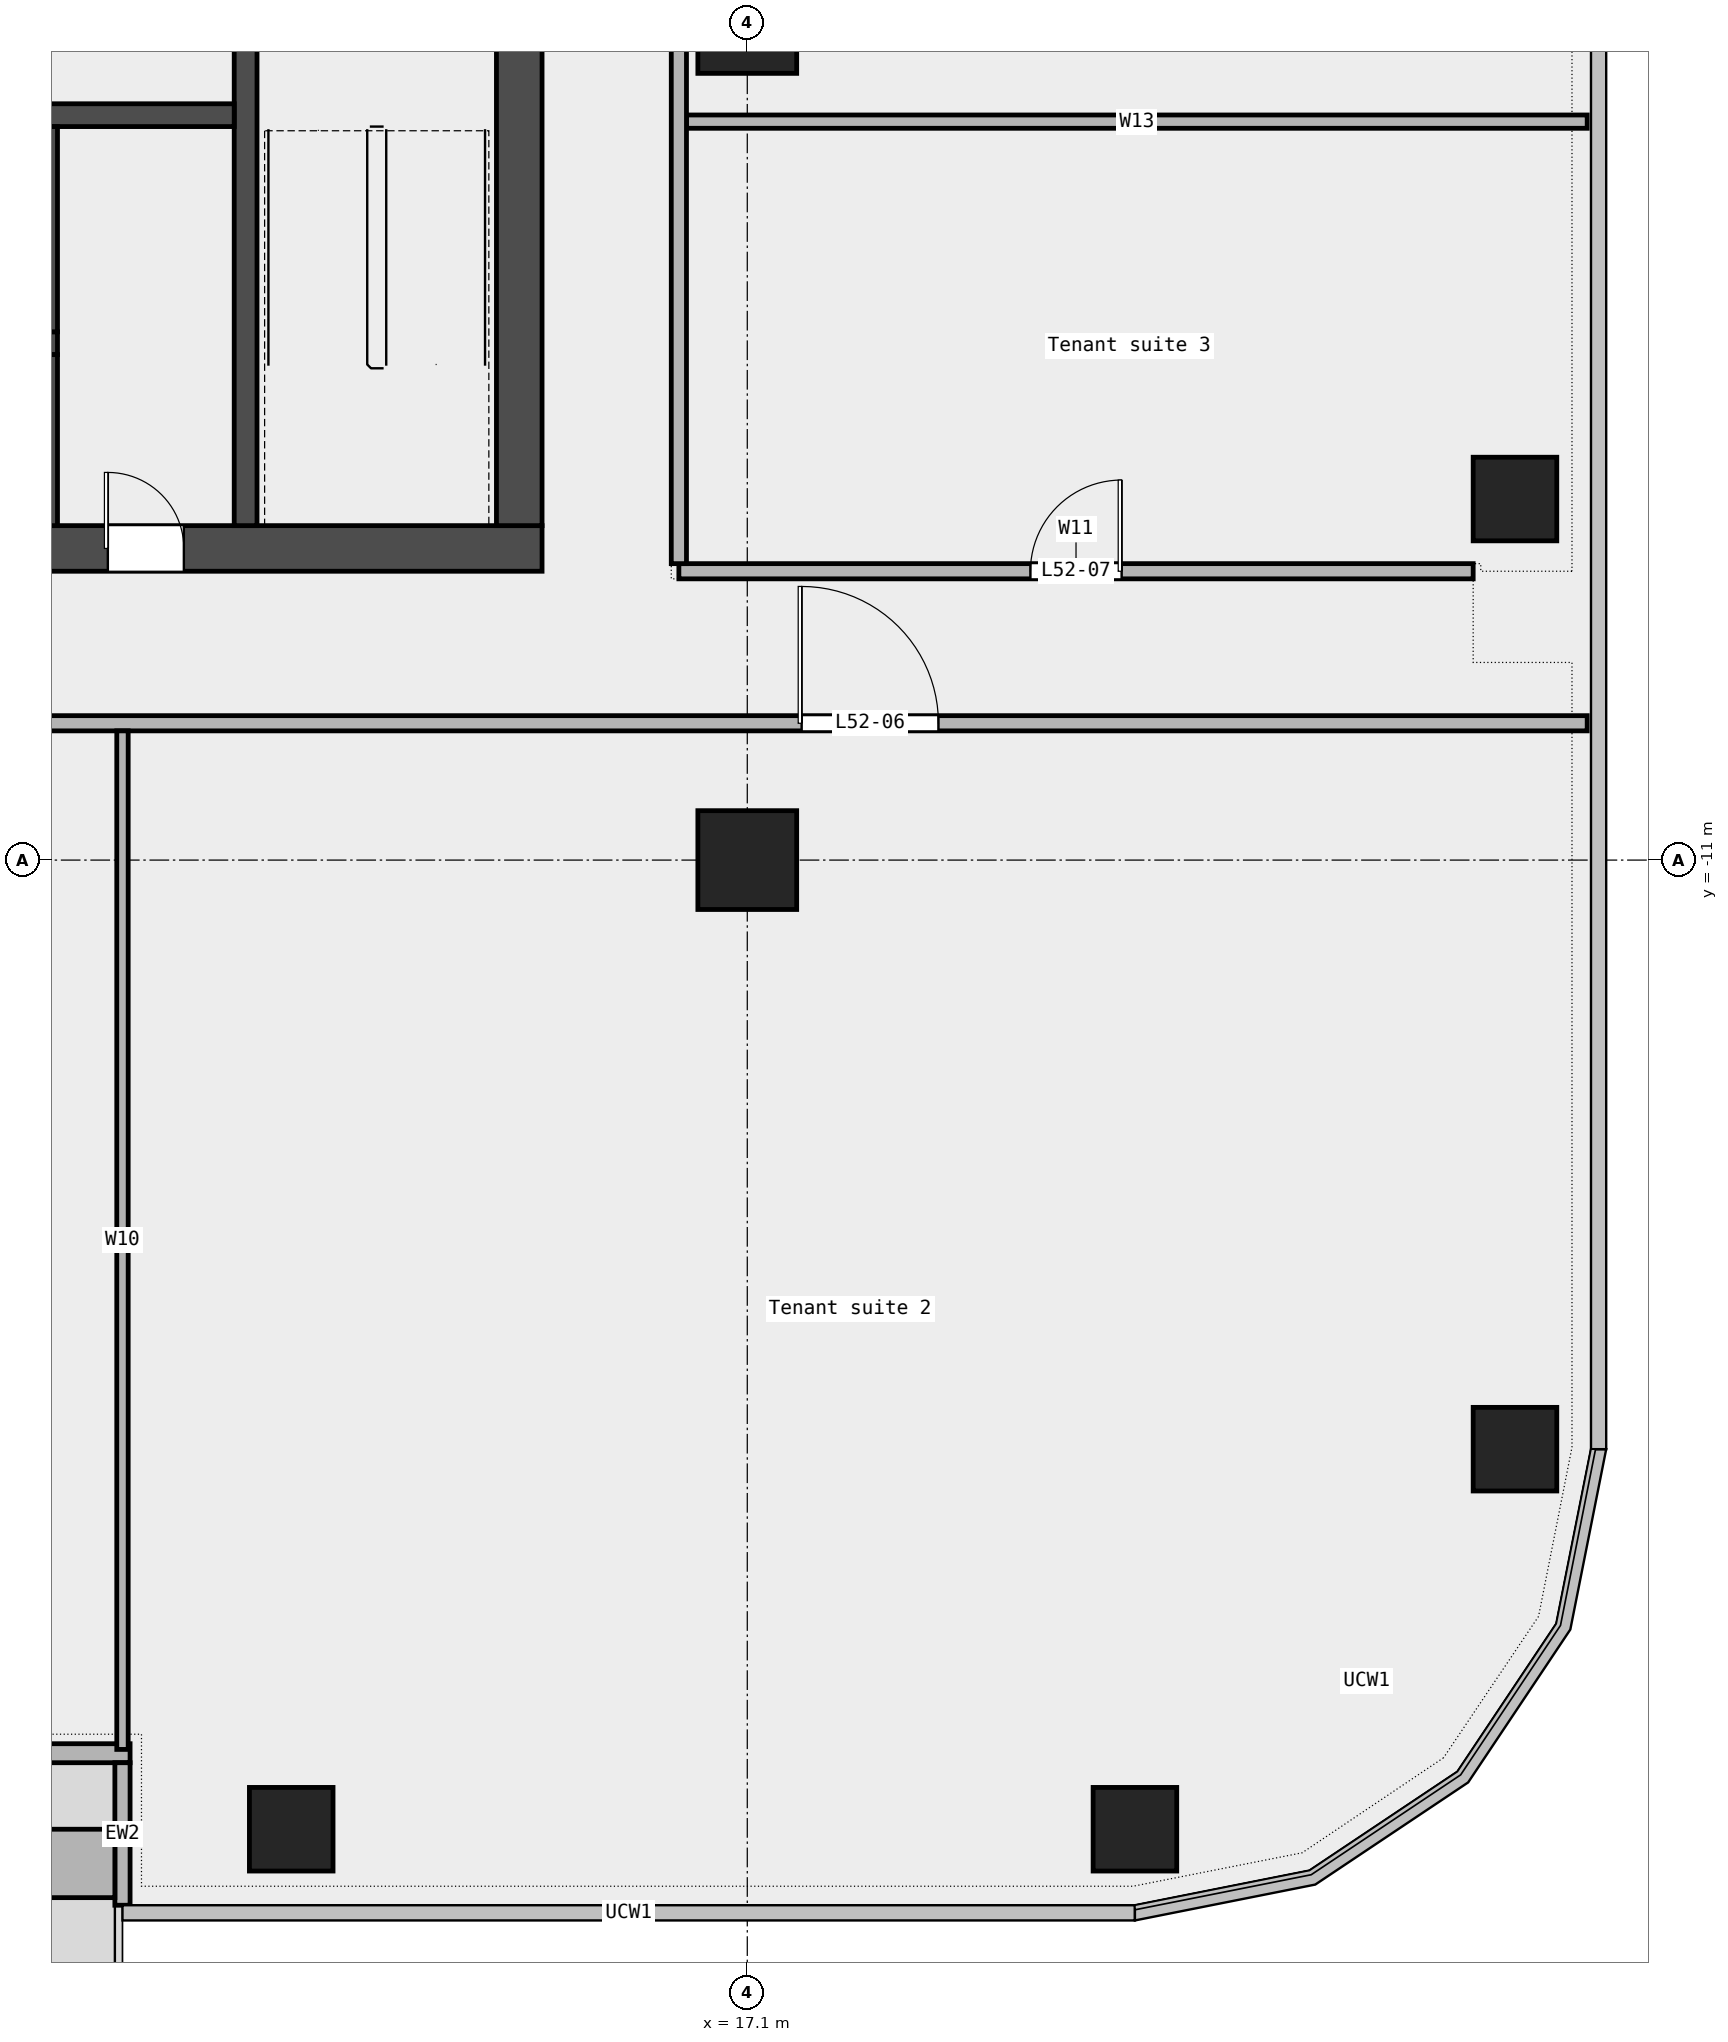
"""IFC4 building model, lengths in metres.
Left out: names, types, materials, properties, quantities, classifications, styles, units other than length and angle.
Written with IfcOpenShell. Run it as: python <this file> out.ifc"""

import sys

from ifc_helpers import new_model, si_unit, direction, frame, frame_2d, origin, origin_2d, place, context, subcontext, project, spatial, rectangle, extrude, element, fill, save


model = new_model("IFC4")
c1 = context("Model", 3, precision=1e-05, world=origin(), true_north=direction((0.0, 1.0)))
c2 = subcontext(c1, "Body", "Model", "MODEL_VIEW")
j1 = project(units=[si_unit("LENGTHUNIT", "METRE"), si_unit("PLANEANGLEUNIT", "RADIAN")], contexts=[c1])
p1 = place(None, origin())
s1 = spatial("IfcSite", under=j1, at=p1, CompositionType="ELEMENT")
p2 = place(p1, origin())
s2 = spatial("IfcBuilding", under=s1, at=p2, CompositionType="ELEMENT")
p3 = place(p2, frame((0.0, 0.0, 243.0)))
s3 = spatial("IfcBuildingStorey", under=s2, at=p3, CompositionType="ELEMENT", Elevation=243.0)
for number, where, z_axis, x_axis in (
    (1, (11.1, -23.75, 0.0), (0.0, 0.0, 1.0), (1.0, 0.0, 0.0)),
    (2, (22.2, -23.75, 0.0), (0.0, 0.0, 1.0), (1.0, 0.0, 0.0)),
    (3, (27.2, -18.75, 0.0), (0.0, 0.0, 1.0), (1.0, 0.0, 0.0)),
    (4, (27.2, -6.25, 0.0), (0.0, 0.0, 1.0), (1.0, 0.0, 0.0)),
):
    element("IfcColumn", number, at=place(p3, frame(where, z_axis=z_axis, x_axis=x_axis)), inside=s3, PredefinedType="COLUMN", context=c2, shape_type="SweptSolid", body=[
        extrude(rectangle(XDim=1.1, YDim=1.1, at=origin_2d()), origin(), (0.0, 0.0, 1.0), 3.6),
    ])
for number, where, z_axis, x_axis in (
    (5, (17.1, -11.0, 0.0), (0.0, 0.0, 1.0), (1.0, 0.0, 0.0)),
    (6, (17.1, 0.0, 0.0), (0.0, 0.0, 1.0), (1.0, 0.0, 0.0)),
):
    element("IfcColumn", number, at=place(p3, frame(where, z_axis=z_axis, x_axis=x_axis)), inside=s3, PredefinedType="COLUMN", context=c2, shape_type="SweptSolid", body=[
        extrude(rectangle(XDim=1.3, YDim=1.3, at=origin_2d()), origin(), (0.0, 0.0, 1.0), 3.6),
    ])
p4 = place(p3, frame((-4.54, -22.75, 0.0), z_axis=(0.0, 0.0, 1.0), x_axis=(1.0, 0.0, 0.0)))
e7 = element("IfcWall", 7, at=p4, inside=s3, PredefinedType="STANDARD", context=c2, shape_type="SweptSolid", body=[
    extrude(rectangle(XDim=13.52, YDim=0.25, at=frame_2d((6.76, 0.0))), origin(), (0.0, 0.0, 1.0), 3.6),
])
p5 = place(p4, frame((1.5, 0.0, 0.45)))
e8 = element("IfcOpeningElement", 8, at=p5, cuts=e7, PredefinedType="OPENING", context=c2, shape_type="SweptSolid", body=[
    extrude(rectangle(XDim=1.5, YDim=2.4, at=frame_2d((0.75, 1.2))), frame((0.0, 0.137, 0.0), z_axis=(0.0, -1.0, 0.0), x_axis=(1.0, 0.0, 0.0)), (0.0, 0.0, 1.0), 0.274),
])
p6 = place(p4, frame((5.75, 0.0, 0.0)))
e9 = element("IfcOpeningElement", 9, at=p6, cuts=e7, PredefinedType="OPENING", context=c2, shape_type="SweptSolid", body=[
    extrude(rectangle(XDim=1.8, YDim=2.4, at=frame_2d((0.9, 1.2))), frame((0.0, 0.137, 0.0), z_axis=(0.0, -1.0, 0.0), x_axis=(1.0, 0.0, 0.0)), (0.0, 0.0, 1.0), 0.274),
])
p7 = place(p4, frame((10.5, 0.0, 0.45)))
e10 = element("IfcOpeningElement", 10, at=p7, cuts=e7, PredefinedType="OPENING", context=c2, shape_type="SweptSolid", body=[
    extrude(rectangle(XDim=1.5, YDim=2.4, at=frame_2d((0.75, 1.2))), frame((0.0, 0.137, 0.0), z_axis=(0.0, -1.0, 0.0), x_axis=(1.0, 0.0, 0.0)), (0.0, 0.0, 1.0), 0.274),
])
p8 = place(p3, frame((8.88, -24.75, 0.0), z_axis=(0.0, 0.0, 1.0), x_axis=(0.0, 1.0, 0.0)))
e11 = element("IfcWall", 11, at=p8, inside=s3, PredefinedType="STANDARD", context=c2, shape_type="SweptSolid", body=[
    extrude(rectangle(XDim=1.875, YDim=0.2, at=frame_2d((0.938, 0.0))), origin(), (0.0, 0.0, 1.0), 3.6),
])
p9 = place(p3, frame((5.18, -24.2, 0.0), z_axis=(0.0, 0.0, 1.0), x_axis=(1.0, 0.0, 0.0)))
e12 = element("IfcWall", 12, at=p9, inside=s3, PredefinedType="STANDARD", context=c2, shape_type="SweptSolid", body=[
    extrude(rectangle(XDim=3.6, YDim=0.9, at=frame_2d((1.8, 0.0))), origin(), (0.0, 0.0, 1.0), 0.7),
])
p10 = place(p3, frame((-28.15, -9.2, 0.0), z_axis=(0.0, 0.0, 1.0), x_axis=(1.0, 0.0, 0.0)))
e13 = element("IfcWall", 13, at=p10, inside=s3, PredefinedType="PARTITIONING", context=c2, shape_type="SweptSolid", body=[
    extrude(rectangle(XDim=56.3, YDim=0.2, at=frame_2d((28.15, 0.0))), origin(), (0.0, 0.0, 1.0), 3.6),
])
p11 = place(p10, frame((29.47, 0.0, 0.0)))
e14 = element("IfcOpeningElement", 14, at=p11, cuts=e13, PredefinedType="OPENING", context=c2, shape_type="SweptSolid", body=[
    extrude(rectangle(XDim=1.8, YDim=2.1, at=frame_2d((0.9, 1.05))), frame((0.0, 0.112, 0.0), z_axis=(0.0, -1.0, 0.0), x_axis=(1.0, 0.0, 0.0)), (0.0, 0.0, 1.0), 0.224),
])
p12 = place(p10, frame((45.965, 0.0, 0.0)))
e15 = element("IfcOpeningElement", 15, at=p12, cuts=e13, PredefinedType="OPENING", context=c2, shape_type="SweptSolid", body=[
    extrude(rectangle(XDim=1.8, YDim=2.1, at=frame_2d((0.9, 1.05))), frame((0.0, 0.112, 0.0), z_axis=(0.0, -1.0, 0.0), x_axis=(1.0, 0.0, 0.0)), (0.0, 0.0, 1.0), 0.224),
])
p13 = place(p10, frame((11.955, 0.0, 0.0)))
e16 = element("IfcOpeningElement", 16, at=p13, cuts=e13, PredefinedType="OPENING", context=c2, shape_type="SweptSolid", body=[
    extrude(rectangle(XDim=1.8, YDim=2.1, at=frame_2d((0.9, 1.05))), frame((0.0, 0.112, 0.0), z_axis=(0.0, -1.0, 0.0), x_axis=(1.0, 0.0, 0.0)), (0.0, 0.0, 1.0), 0.224),
])
p14 = place(p3, frame((16.2, -7.2, 0.0), z_axis=(0.0, 0.0, 1.0), x_axis=(1.0, 0.0, 0.0)))
e17 = element("IfcWall", 17, at=p14, inside=s3, PredefinedType="PARTITIONING", context=c2, shape_type="SweptSolid", body=[
    extrude(rectangle(XDim=10.45, YDim=0.2, at=frame_2d((5.225, 0.0))), origin(), (0.0, 0.0, 1.0), 3.6),
])
p15 = place(p14, frame((4.625, 0.0, 0.0)))
e18 = element("IfcOpeningElement", 18, at=p15, cuts=e17, PredefinedType="OPENING", context=c2, shape_type="SweptSolid", body=[
    extrude(rectangle(XDim=1.2, YDim=2.1, at=frame_2d((0.6, 1.05))), frame((0.0, 0.112, 0.0), z_axis=(0.0, -1.0, 0.0), x_axis=(1.0, 0.0, 0.0)), (0.0, 0.0, 1.0), 0.224),
])
p16 = place(p3, frame((16.3, -1.285, 0.0), z_axis=(0.0, 0.0, 1.0), x_axis=(1.0, 0.0, 0.0)))
e19 = element("IfcWall", 19, at=p16, inside=s3, PredefinedType="PARTITIONING", context=c2, shape_type="SweptSolid", body=[
    extrude(rectangle(XDim=11.85, YDim=0.175, at=frame_2d((5.925, 0.0))), origin(), (0.0, 0.0, 1.0), 3.6),
])
p17 = place(p3, frame((8.88, -22.7, 0.0), z_axis=(0.0, 0.0, 1.0), x_axis=(0.0, 1.0, 0.0)))
e20 = element("IfcWall", 20, at=p17, inside=s3, PredefinedType="PARTITIONING", context=c2, shape_type="SweptSolid", body=[
    extrude(rectangle(XDim=13.4, YDim=0.15, at=frame_2d((6.7, 0.0))), origin(), (0.0, 0.0, 1.0), 3.6),
])
p18 = place(p3, frame((16.2, -7.1, 0.0), z_axis=(0.0, 0.0, 1.0), x_axis=(0.0, 1.0, 0.0)))
e21 = element("IfcWall", 21, at=p18, inside=s3, PredefinedType="PARTITIONING", context=c2, shape_type="SweptSolid", body=[
    extrude(rectangle(XDim=20.5, YDim=0.2, at=frame_2d((10.25, 0.0))), origin(), (0.0, 0.0, 1.0), 3.6),
])
p19 = place(p18, frame((12.258, 0.0, 0.0)))
e22 = element("IfcOpeningElement", 22, at=p19, cuts=e21, PredefinedType="OPENING", context=c2, shape_type="SweptSolid", body=[
    extrude(rectangle(XDim=1.8, YDim=2.1, at=frame_2d((0.9, 1.05))), frame((0.0, 0.112, 0.0), z_axis=(0.0, -1.0, 0.0), x_axis=(1.0, 0.0, 0.0)), (0.0, 0.0, 1.0), 0.224),
])
p20 = place(p3, frame((-14.4, -6.9, 0.0), z_axis=(0.0, 0.0, 1.0), x_axis=(1.0, 0.0, 0.0)))
e23 = element("IfcWall", 23, at=p20, inside=s3, PredefinedType="SHEAR", context=c2, shape_type="SweptSolid", body=[
    extrude(rectangle(XDim=28.8, YDim=0.6, at=frame_2d((14.4, 0.0))), origin(), (0.0, 0.0, 1.0), 3.7),
])
p21 = place(p20, frame((4.337, 0.0, 0.0)))
e24 = element("IfcOpeningElement", 24, at=p21, cuts=e23, PredefinedType="OPENING", context=c2, shape_type="SweptSolid", body=[
    extrude(rectangle(XDim=1.0, YDim=2.1, at=frame_2d((0.5, 1.05))), frame((0.0, 0.312, 0.0), z_axis=(0.0, -1.0, 0.0), x_axis=(1.0, 0.0, 0.0)), (0.0, 0.0, 1.0), 0.624),
])
p22 = place(p20, frame((8.55, 0.0, 0.0)))
e25 = element("IfcOpeningElement", 25, at=p22, cuts=e23, PredefinedType="OPENING", context=c2, shape_type="SweptSolid", body=[
    extrude(rectangle(XDim=1.2, YDim=2.1, at=frame_2d((0.6, 1.05))), frame((0.0, 0.312, 0.0), z_axis=(0.0, -1.0, 0.0), x_axis=(1.0, 0.0, 0.0)), (0.0, 0.0, 1.0), 0.624),
])
p23 = place(p20, frame((12.962, 0.0, 0.0)))
e26 = element("IfcOpeningElement", 26, at=p23, cuts=e23, PredefinedType="OPENING", context=c2, shape_type="SweptSolid", body=[
    extrude(rectangle(XDim=1.0, YDim=2.1, at=frame_2d((0.5, 1.05))), frame((0.0, 0.312, 0.0), z_axis=(0.0, -1.0, 0.0), x_axis=(1.0, 0.0, 0.0)), (0.0, 0.0, 1.0), 0.624),
])
p24 = place(p20, frame((15.212, 0.0, 0.0)))
e27 = element("IfcOpeningElement", 27, at=p24, cuts=e23, PredefinedType="OPENING", context=c2, shape_type="SweptSolid", body=[
    extrude(rectangle(XDim=1.0, YDim=2.1, at=frame_2d((0.5, 1.05))), frame((0.0, 0.312, 0.0), z_axis=(0.0, -1.0, 0.0), x_axis=(1.0, 0.0, 0.0)), (0.0, 0.0, 1.0), 0.624),
])
p25 = place(p20, frame((18.75, 0.0, 0.0)))
e28 = element("IfcOpeningElement", 28, at=p25, cuts=e23, PredefinedType="OPENING", context=c2, shape_type="SweptSolid", body=[
    extrude(rectangle(XDim=1.8, YDim=2.1, at=frame_2d((0.9, 1.05))), frame((0.0, 0.312, 0.0), z_axis=(0.0, -1.0, 0.0), x_axis=(1.0, 0.0, 0.0)), (0.0, 0.0, 1.0), 0.624),
])
p26 = place(p20, frame((23.087, 0.0, 0.0)))
e29 = element("IfcOpeningElement", 29, at=p26, cuts=e23, PredefinedType="OPENING", context=c2, shape_type="SweptSolid", body=[
    extrude(rectangle(XDim=1.0, YDim=2.1, at=frame_2d((0.5, 1.05))), frame((0.0, 0.312, 0.0), z_axis=(0.0, -1.0, 0.0), x_axis=(1.0, 0.0, 0.0)), (0.0, 0.0, 1.0), 0.624),
])
p27 = place(p3, frame((14.1, -6.6, 0.0), z_axis=(0.0, 0.0, 1.0), x_axis=(0.0, 1.0, 0.0)))
e30 = element("IfcWall", 30, at=p27, inside=s3, PredefinedType="SHEAR", context=c2, shape_type="SweptSolid", body=[
    extrude(rectangle(XDim=19.5, YDim=0.6, at=frame_2d((9.75, 0.0))), origin(), (0.0, 0.0, 1.0), 3.7),
])
p28 = place(p27, frame((9.3, 0.0, 0.0)))
e31 = element("IfcOpeningElement", 31, at=p28, cuts=e30, PredefinedType="OPENING", context=c2, shape_type="SweptSolid", body=[
    extrude(rectangle(XDim=1.8, YDim=2.1, at=frame_2d((0.9, 1.05))), frame((0.0, 0.312, 0.0), z_axis=(0.0, -1.0, 0.0), x_axis=(1.0, 0.0, 0.0)), (0.0, 0.0, 1.0), 0.624),
])
p29 = place(p3, frame((10.5, -6.6, 0.0), z_axis=(0.0, 0.0, 1.0), x_axis=(0.0, 1.0, 0.0)))
e32 = element("IfcWall", 32, at=p29, inside=s3, PredefinedType="SHEAR", context=c2, shape_type="SweptSolid", body=[
    extrude(rectangle(XDim=8.55, YDim=0.3, at=frame_2d((4.275, 0.0))), origin(), (0.0, 0.0, 1.0), 3.7),
])
p30 = place(p3, frame((-10.35, -1.2, 0.0), z_axis=(0.0, 0.0, 1.0), x_axis=(1.0, 0.0, 0.0)))
e33 = element("IfcWall", 33, at=p30, inside=s3, PredefinedType="SOLIDWALL", context=c2, shape_type="SweptSolid", body=[
    extrude(rectangle(XDim=20.7, YDim=0.3, at=frame_2d((10.35, 0.0))), origin(), (0.0, 0.0, 1.0), 3.7),
])
p31 = place(p3, frame((2.475, -4.2, 0.0), z_axis=(0.0, 0.0, 1.0), x_axis=(1.0, 0.0, 0.0)))
e34 = element("IfcWall", 34, at=p31, inside=s3, PredefinedType="SOLIDWALL", context=c2, shape_type="SweptSolid", body=[
    extrude(rectangle(XDim=5.55, YDim=0.3, at=frame_2d((2.775, 0.0))), origin(), (0.0, 0.0, 1.0), 3.7),
])
p32 = place(p31, frame((0.762, 0.0, 0.0)))
e35 = element("IfcOpeningElement", 35, at=p32, cuts=e34, PredefinedType="OPENING", context=c2, shape_type="SweptSolid", body=[
    extrude(rectangle(XDim=1.4, YDim=2.1, at=frame_2d((0.7, 1.05))), frame((0.0, 0.162, 0.0), z_axis=(0.0, -1.0, 0.0), x_axis=(1.0, 0.0, 0.0)), (0.0, 0.0, 1.0), 0.324),
])
p33 = place(p31, frame((3.387, 0.0, 0.0)))
e36 = element("IfcOpeningElement", 36, at=p33, cuts=e34, PredefinedType="OPENING", context=c2, shape_type="SweptSolid", body=[
    extrude(rectangle(XDim=1.4, YDim=2.1, at=frame_2d((0.7, 1.05))), frame((0.0, 0.162, 0.0), z_axis=(0.0, -1.0, 0.0), x_axis=(1.0, 0.0, 0.0)), (0.0, 0.0, 1.0), 0.324),
])
p34 = place(p3, frame((7.875, -4.05, 0.0), z_axis=(0.0, 0.0, 1.0), x_axis=(0.0, 1.0, 0.0)))
e37 = element("IfcWall", 37, at=p34, inside=s3, PredefinedType="SOLIDWALL", context=c2, shape_type="SweptSolid", body=[
    extrude(rectangle(XDim=2.7, YDim=0.3, at=frame_2d((1.35, 0.0))), origin(), (0.0, 0.0, 1.0), 3.7),
])
p35 = place(p3, frame((7.875, -6.6, 0.0), z_axis=(0.0, 0.0, 1.0), x_axis=(0.0, 1.0, 0.0)))
e38 = element("IfcWall", 38, at=p35, inside=s3, PredefinedType="SOLIDWALL", context=c2, shape_type="SweptSolid", body=[
    extrude(rectangle(XDim=2.25, YDim=0.3, at=frame_2d((1.125, 0.0))), origin(), (0.0, 0.0, 1.0), 3.7),
])
p36 = place(p12, origin())
e39 = element("IfcDoor", 39, at=p36, inside=s3, OperationType="DOUBLE_DOOR_SINGLE_SWING", PredefinedType="DOOR", context=c2, shape_type="SweptSolid", body=[
    extrude(rectangle(XDim=1.8, YDim=2.1, at=frame_2d((0.9, 1.05))), frame((0.0, 0.025, 0.0), z_axis=(0.0, -1.0, 0.0), x_axis=(1.0, 0.0, 0.0)), (0.0, 0.0, 1.0), 0.05),
])
fill(e15, e39)
p37 = place(p15, origin())
e40 = element("IfcDoor", 40, at=p37, inside=s3, OperationType="SINGLE_SWING_RIGHT", PredefinedType="DOOR", context=c2, shape_type="SweptSolid", body=[
    extrude(rectangle(XDim=1.2, YDim=2.1, at=frame_2d((0.6, 1.05))), frame((0.0, 0.025, 0.0), z_axis=(0.0, -1.0, 0.0), x_axis=(1.0, 0.0, 0.0)), (0.0, 0.0, 1.0), 0.05),
])
fill(e18, e40)
p38 = place(p26, origin())
e41 = element("IfcDoor", 41, at=p38, inside=s3, OperationType="SINGLE_SWING_LEFT", PredefinedType="DOOR", context=c2, shape_type="SweptSolid", body=[
    extrude(rectangle(XDim=1.0, YDim=2.1, at=frame_2d((0.5, 1.05))), frame((0.0, 0.025, 0.0), z_axis=(0.0, -1.0, 0.0), x_axis=(1.0, 0.0, 0.0)), (0.0, 0.0, 1.0), 0.05),
])
fill(e29, e41)
save(model, sys.argv[1])
